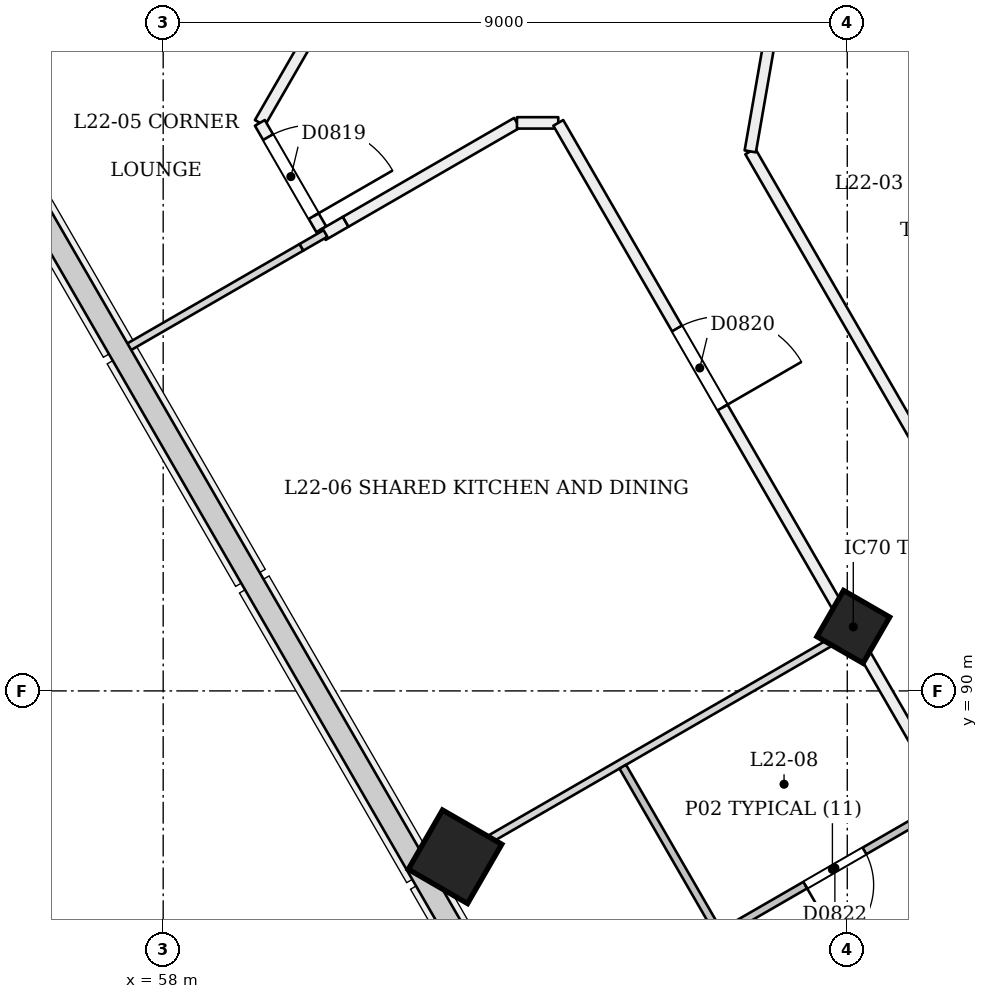
"""IFC4 building model, lengths in metres.
Left out: names, types, materials, properties, quantities, classifications, styles, units other than length and angle.
Written with IfcOpenShell. Run it as: python <this file> out.ifc"""

import sys

from ifc_helpers import new_model, si_unit, direction, frame, frame_2d, origin, origin_2d, place, context, subcontext, project, spatial, rectangle, extrude, element, fill, save


model = new_model("IFC4")
c1 = context("Model", 3, precision=1e-05, world=origin(), true_north=direction((0.0, 1.0)))
c2 = subcontext(c1, "Body", "Model", "MODEL_VIEW")
j1 = project(units=[si_unit("LENGTHUNIT", "METRE"), si_unit("PLANEANGLEUNIT", "RADIAN")], contexts=[c1])
p1 = place(None, origin())
s1 = spatial("IfcSite", under=j1, at=p1, CompositionType="ELEMENT")
p2 = place(p1, origin())
s2 = spatial("IfcBuilding", under=s1, at=p2, CompositionType="ELEMENT")
p3 = place(p2, frame((0.0, 0.0, 88.2)))
s3 = spatial("IfcBuildingStorey", under=s2, at=p3, CompositionType="ELEMENT", Elevation=88.2)
p4 = place(p3, frame((67.052, 90.796, -0.021), z_axis=(0.022221406801, 0.038413224561, 0.999014831351), x_axis=(-0.866024065394, -0.498523117158, 0.038432015521)))
e1 = element("IfcColumn", 1, at=p4, inside=s3, PredefinedType="COLUMN", context=c2, shape_type="SweptSolid", body=[
    extrude(rectangle(XDim=0.7, YDim=0.7, at=origin_2d()), origin(), (0.0, 0.0, 1.0), 3.604),
])
p5 = place(p3, frame((61.812, 87.771, -0.027), z_axis=(0.022153634206, 0.038480930364, 0.999013730882), x_axis=(-0.864979728815, -0.500331280926, 0.038453583269)))
e2 = element("IfcColumn", 2, at=p5, inside=s3, PredefinedType="COLUMN", context=c2, shape_type="SweptSolid", body=[
    extrude(rectangle(XDim=0.9, YDim=0.9, at=origin_2d()), origin(), (0.0, 0.0, 1.0), 3.604),
])
p6 = place(p3, frame((68.436, 92.4, 0.0), z_axis=(0.0, 0.0, 1.0), x_axis=(-0.499982159162, 0.866035703952, 0.0)))
e3 = element("IfcWall", 3, at=p6, inside=s3, PredefinedType="PARTITIONING", context=c2, shape_type="SweptSolid", body=[
    extrude(rectangle(XDim=5.425, YDim=0.15, at=frame_2d((2.712, 0.0))), origin(), (0.0, 0.0, 1.0), 3.1),
])
p7 = place(p3, frame((65.724, 97.098, 0.0), z_axis=(0.0, 0.0, 1.0), x_axis=(0.17154650213, 0.985176023666, 0.0)))
e4 = element("IfcWall", 4, at=p7, inside=s3, PredefinedType="PARTITIONING", context=c2, shape_type="SweptSolid", body=[
    extrude(rectangle(XDim=1.555, YDim=0.15, at=frame_2d((0.778, 0.0))), origin(), (0.0, 0.0, 1.0), 3.1),
])
p8 = place(p3, frame((59.865, 98.5, 0.0), z_axis=(0.0, 0.0, 1.0), x_axis=(-0.500013496215, -0.866017611601, 0.0)))
e5 = element("IfcWall", 5, at=p8, inside=s3, PredefinedType="PARTITIONING", context=c2, shape_type="SweptSolid", body=[
    extrude(rectangle(XDim=1.186, YDim=0.15, at=frame_2d((0.593, 0.0))), origin(), (0.0, 0.0, 1.0), 2.6),
])
p9 = place(p3, frame((59.272, 97.473, 0.0), z_axis=(0.0, 0.0, 1.0), x_axis=(0.500005767435, -0.866022073929, 0.0)))
e6 = element("IfcWall", 6, at=p9, inside=s3, PredefinedType="PARTITIONING", context=c2, shape_type="SweptSolid", body=[
    extrude(rectangle(XDim=1.616, YDim=0.15, at=frame_2d((0.808, 0.0))), origin(), (0.0, 0.0, 1.0), 2.6),
])
p10 = place(p9, frame((0.216, 0.0, 0.0)))
e7 = element("IfcOpeningElement", 7, at=p10, cuts=e6, PredefinedType="OPENING", context=c2, shape_type="SweptSolid", body=[
    extrude(rectangle(XDim=1.2, YDim=2.1, at=frame_2d((0.6, 1.05))), frame((0.0, 0.085, 0.0), z_axis=(0.0, -1.0, 0.0), x_axis=(1.0, 0.0, 0.0)), (0.0, 0.0, 1.0), 0.171),
])
p11 = place(p3, frame((60.1, 95.998, 0.0), z_axis=(0.0, 0.0, 1.0), x_axis=(0.866115353951, 0.499844169366, 0.0)))
e8 = element("IfcWall", 8, at=p11, inside=s3, PredefinedType="PARTITIONING", context=c2, shape_type="SweptSolid", body=[
    extrude(rectangle(XDim=0.347, YDim=0.15, at=frame_2d((0.174, 0.0))), origin(), (0.0, 0.0, 1.0), 2.6),
])
p12 = place(p3, frame((60.401, 96.172, 0.0), z_axis=(0.0, 0.0, 1.0), x_axis=(0.866023087339, 0.500004012181, 0.0)))
e9 = element("IfcWall", 9, at=p12, inside=s3, PredefinedType="PARTITIONING", context=c2, shape_type="SweptSolid", body=[
    extrude(rectangle(XDim=2.602, YDim=0.15, at=frame_2d((1.301, 0.0))), origin(), (0.0, 0.0, 1.0), 3.1),
])
p13 = place(p3, frame((62.654, 97.473, 0.0), z_axis=(0.0, 0.0, 1.0), x_axis=(1.0, 0.0, 0.0)))
e10 = element("IfcWall", 10, at=p13, inside=s3, PredefinedType="PARTITIONING", context=c2, shape_type="SweptSolid", body=[
    extrude(rectangle(XDim=0.544, YDim=0.15, at=frame_2d((0.272, 0.0))), origin(), (0.0, 0.0, 1.0), 3.1),
])
p14 = place(p3, frame((63.198, 97.473, 0.0), z_axis=(0.0, 0.0, 1.0), x_axis=(0.499996804348, -0.866027248787, 0.0)))
e11 = element("IfcWall", 11, at=p14, inside=s3, PredefinedType="PARTITIONING", context=c2, shape_type="SweptSolid", body=[
    extrude(rectangle(XDim=42.418, YDim=0.15, at=frame_2d((21.209, 0.0))), origin(), (0.0, 0.0, 1.0), 2.7),
])
p15 = place(p14, frame((3.123, 0.0, 0.0)))
e12 = element("IfcOpeningElement", 12, at=p15, cuts=e11, PredefinedType="OPENING", context=c2, shape_type="SweptSolid", body=[
    extrude(rectangle(XDim=1.2, YDim=2.1, at=frame_2d((0.6, 1.05))), frame((0.0, 0.085, 0.0), z_axis=(0.0, -1.0, 0.0), x_axis=(1.0, 0.0, 0.0)), (0.0, 0.0, 1.0), 0.171),
])
p16 = place(p14, frame((10.538, 0.0, 0.0)))
e13 = element("IfcOpeningElement", 13, at=p16, cuts=e11, PredefinedType="OPENING", context=c2, shape_type="SweptSolid", body=[
    extrude(rectangle(XDim=1.1, YDim=2.1, at=frame_2d((0.55, 1.05))), frame((0.0, 0.085, 0.0), z_axis=(0.0, -1.0, 0.0), x_axis=(1.0, 0.0, 0.0)), (0.0, 0.0, 1.0), 0.171),
])
p17 = place(p14, frame((12.814, 0.0, 0.0)))
e14 = element("IfcOpeningElement", 14, at=p17, cuts=e11, PredefinedType="OPENING", context=c2, shape_type="SweptSolid", body=[
    extrude(rectangle(XDim=1.0, YDim=2.1, at=frame_2d((0.5, 1.05))), frame((0.0, 0.085, 0.0), z_axis=(0.0, -1.0, 0.0), x_axis=(1.0, 0.0, 0.0)), (0.0, 0.0, 1.0), 0.171),
])
p18 = place(p14, frame((20.609, 0.0, 0.0)))
e15 = element("IfcOpeningElement", 15, at=p18, cuts=e11, PredefinedType="OPENING", context=c2, shape_type="SweptSolid", body=[
    extrude(rectangle(XDim=1.2, YDim=2.1, at=frame_2d((0.6, 1.05))), frame((0.0, 0.085, 0.0), z_axis=(0.0, -1.0, 0.0), x_axis=(1.0, 0.0, 0.0)), (0.0, 0.0, 1.0), 0.171),
])
p19 = place(p14, frame((27.459, 0.0, 0.0)))
e16 = element("IfcOpeningElement", 16, at=p19, cuts=e11, PredefinedType="OPENING", context=c2, shape_type="SweptSolid", body=[
    extrude(rectangle(XDim=1.0, YDim=2.1, at=frame_2d((0.5, 1.05))), frame((0.0, 0.085, 0.0), z_axis=(0.0, -1.0, 0.0), x_axis=(1.0, 0.0, 0.0)), (0.0, 0.0, 1.0), 0.171),
])
p20 = place(p14, frame((31.959, 0.0, 0.0)))
e17 = element("IfcOpeningElement", 17, at=p20, cuts=e11, PredefinedType="OPENING", context=c2, shape_type="SweptSolid", body=[
    extrude(rectangle(XDim=1.0, YDim=2.1, at=frame_2d((0.5, 1.05))), frame((0.0, 0.085, 0.0), z_axis=(0.0, -1.0, 0.0), x_axis=(1.0, 0.0, 0.0)), (0.0, 0.0, 1.0), 0.171),
])
p21 = place(p14, frame((40.905, 0.0, 0.0)))
e18 = element("IfcOpeningElement", 18, at=p21, cuts=e11, PredefinedType="OPENING", context=c2, shape_type="SweptSolid", body=[
    extrude(rectangle(XDim=1.2, YDim=2.1, at=frame_2d((0.6, 1.05))), frame((0.0, 0.085, 0.0), z_axis=(0.0, -1.0, 0.0), x_axis=(1.0, 0.0, 0.0)), (0.0, 0.0, 1.0), 0.171),
])
p22 = place(p3, frame((57.502, 94.498, 0.0), z_axis=(0.0, 0.0, 1.0), x_axis=(0.866033651025, 0.499985715088, 0.0)))
e19 = element("IfcWall", 19, at=p22, inside=s3, PredefinedType="PARTITIONING", context=c2, shape_type="SweptSolid", body=[
    extrude(rectangle(XDim=2.676, YDim=0.1, at=frame_2d((1.338, 0.0))), origin(), (0.0, 0.0, 1.0), 3.1),
])
p23 = place(p3, frame((59.819, 95.836, 0.0), z_axis=(0.0, 0.0, 1.0), x_axis=(0.866006986733, 0.500031897912, 0.0)))
e20 = element("IfcWall", 20, at=p23, inside=s3, PredefinedType="PARTITIONING", context=c2, shape_type="SweptSolid", body=[
    extrude(rectangle(XDim=0.364, YDim=0.1, at=frame_2d((0.182, 0.0))), origin(), (0.0, 0.0, 1.0), 2.6),
])
p24 = place(p3, frame((61.51, 87.597, 0.0), z_axis=(0.0, 0.0, 1.0), x_axis=(0.866032601554, 0.49998753289, 0.0)))
e21 = element("IfcWall", 21, at=p24, inside=s3, PredefinedType="PARTITIONING", context=c2, shape_type="SweptSolid", body=[
    extrude(rectangle(XDim=6.325, YDim=0.1, at=frame_2d((3.163, 0.0))), origin(), (0.0, 0.0, 1.0), 2.6),
])
p25 = place(p3, frame((68.288, 88.508, 0.0), z_axis=(0.0, 0.0, 1.0), x_axis=(-0.866019409031, -0.500010383074, 0.0)))
e22 = element("IfcWall", 22, at=p25, inside=s3, PredefinedType="PARTITIONING", context=c2, shape_type="SweptSolid", body=[
    extrude(rectangle(XDim=3.425, YDim=0.1, at=frame_2d((1.713, 0.0))), origin(), (0.0, 0.0, 1.0), 3.1),
])
p26 = place(p25, frame((1.225, 0.0, 0.0)))
e23 = element("IfcOpeningElement", 23, at=p26, cuts=e22, PredefinedType="OPENING", context=c2, shape_type="SweptSolid", body=[
    extrude(rectangle(XDim=0.9, YDim=2.1, at=frame_2d((0.45, 1.05))), frame((0.0, 0.061, 0.0), z_axis=(0.0, -1.0, 0.0), x_axis=(1.0, 0.0, 0.0)), (0.0, 0.0, 1.0), 0.121),
])
p27 = place(p3, frame((65.321, 86.795, 0.0), z_axis=(0.0, 0.0, 1.0), x_axis=(-0.499948979701, 0.866054858364, 0.0)))
e24 = element("IfcWall", 24, at=p27, inside=s3, PredefinedType="PARTITIONING", context=c2, shape_type="SweptSolid", body=[
    extrude(rectangle(XDim=2.55, YDim=0.1, at=frame_2d((1.275, 0.0))), origin(), (0.0, 0.0, 1.0), 2.7),
])
p28 = place(p10, origin())
e25 = element("IfcDoor", 25, at=p28, inside=s3, OperationType="SINGLE_SWING_RIGHT", PredefinedType="NOTDEFINED", context=c2, shape_type="SweptSolid", body=[
    extrude(rectangle(XDim=1.2, YDim=2.1, at=frame_2d((0.6, 1.05))), frame((0.0, 0.025, 0.0), z_axis=(0.0, -1.0, 0.0), x_axis=(1.0, 0.0, 0.0)), (0.0, 0.0, 1.0), 0.05),
])
fill(e7, e25)
p29 = place(p15, origin())
e26 = element("IfcDoor", 26, at=p29, inside=s3, OperationType="SINGLE_SWING_RIGHT", PredefinedType="NOTDEFINED", context=c2, shape_type="SweptSolid", body=[
    extrude(rectangle(XDim=1.2, YDim=2.1, at=frame_2d((0.6, 1.05))), frame((0.0, 0.025, 0.0), z_axis=(0.0, -1.0, 0.0), x_axis=(1.0, 0.0, 0.0)), (0.0, 0.0, 1.0), 0.05),
])
fill(e12, e26)
p30 = place(p26, origin())
e27 = element("IfcDoor", 27, at=p30, inside=s3, OperationType="SINGLE_SWING_RIGHT", PredefinedType="NOTDEFINED", context=c2, shape_type="SweptSolid", body=[
    extrude(rectangle(XDim=0.9, YDim=2.1, at=frame_2d((0.45, 1.05))), frame((0.0, 0.025, 0.0), z_axis=(0.0, -1.0, 0.0), x_axis=(1.0, 0.0, 0.0)), (0.0, 0.0, 1.0), 0.05),
])
fill(e23, e27)
save(model, sys.argv[1])
